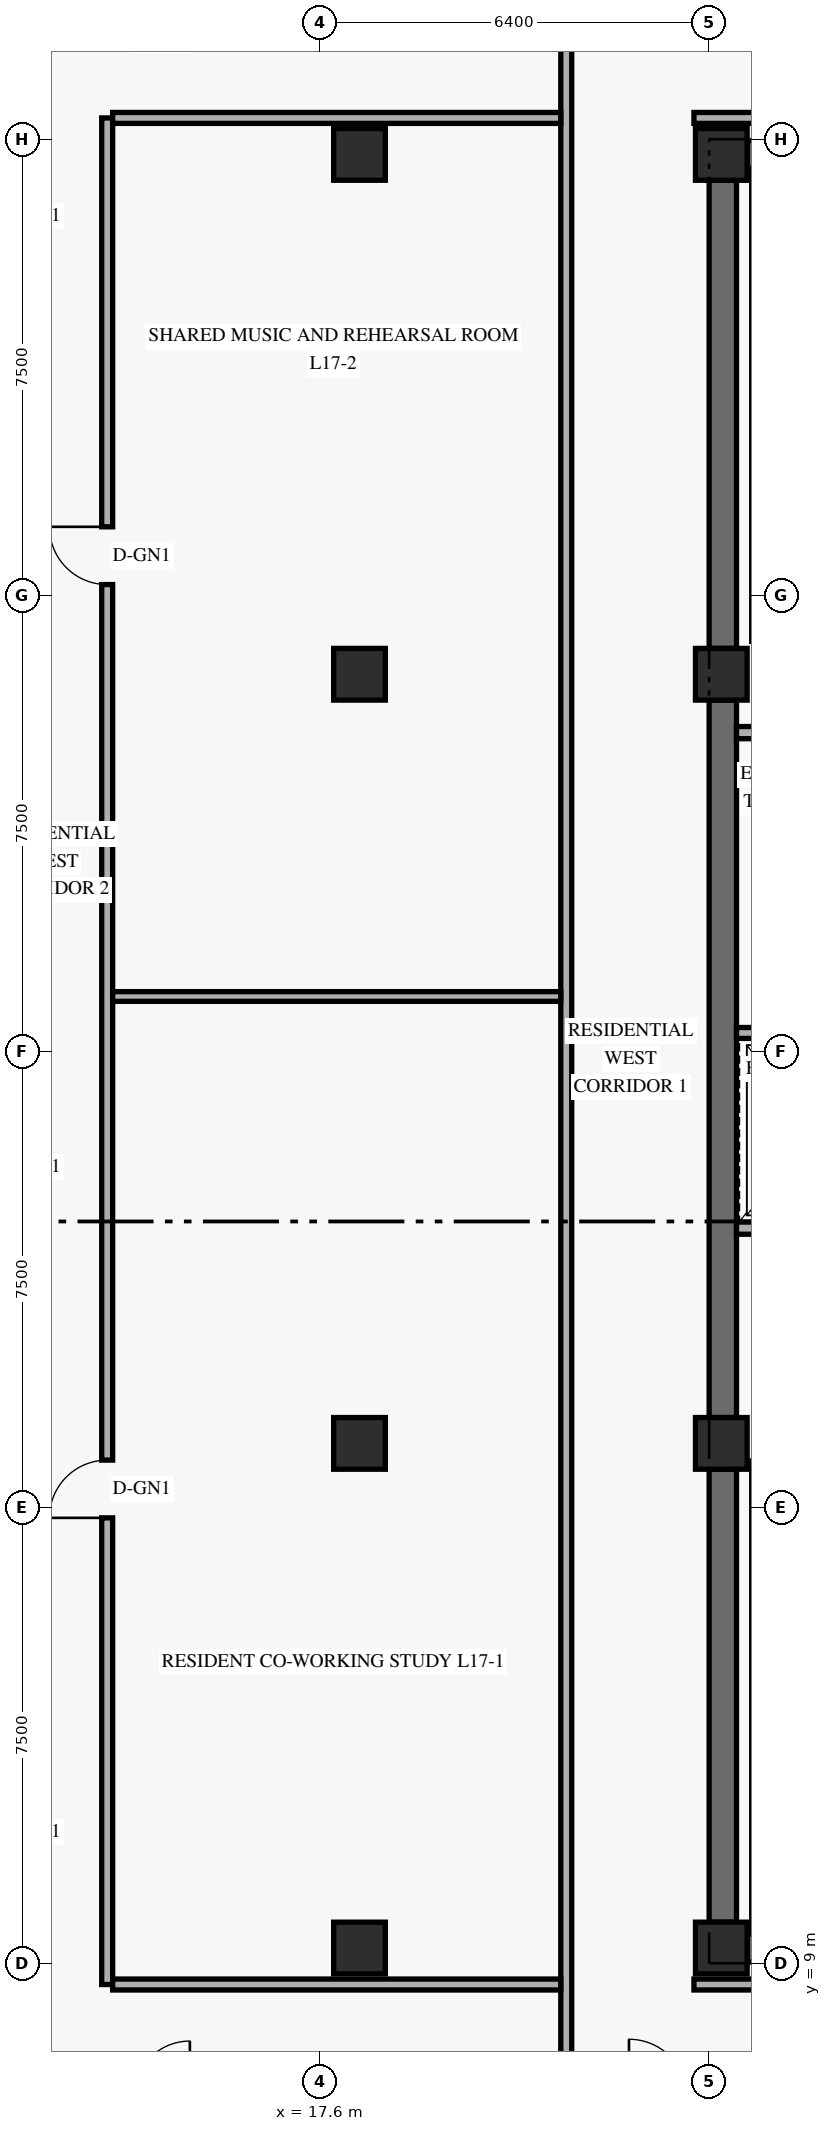
"""IFC4 building model, lengths in metres.
Left out: names, types, materials, properties, quantities, classifications, styles, units other than length and angle.
Written with IfcOpenShell. Run it as: python <this file> out.ifc"""

import sys

from ifc_helpers import new_model, si_unit, direction, frame, frame_2d, origin, origin_2d, place, context, subcontext, project, spatial, rectangle, extrude, element, fill, save


model = new_model("IFC4")
c1 = context("Model", 3, precision=1e-05, world=origin(), true_north=direction((0.0, 1.0)))
c2 = subcontext(c1, "Body", "Model", "MODEL_VIEW")
j1 = project(units=[si_unit("LENGTHUNIT", "METRE"), si_unit("PLANEANGLEUNIT", "RADIAN")], contexts=[c1])
p1 = place(None, origin())
s1 = spatial("IfcSite", under=j1, at=p1, CompositionType="ELEMENT")
p2 = place(p1, origin())
s2 = spatial("IfcBuilding", under=s1, at=p2, CompositionType="ELEMENT")
p3 = place(p2, frame((0.0, 0.0, 67.8)))
s3 = spatial("IfcBuildingStorey", under=s2, at=p3, CompositionType="ELEMENT", Elevation=67.8)
p4 = place(p3, frame((24.225, 9.675, 0.0), z_axis=(0.0, 0.0, 1.0), x_axis=(0.0, 1.0, 0.0)))
e1 = element("IfcWall", 1, at=p4, inside=s3, PredefinedType="SHEAR", context=c2, shape_type="SweptSolid", body=[
    extrude(rectangle(XDim=7.45, YDim=0.45, at=frame_2d((3.725, 0.0))), origin(), (0.0, 0.0, 1.0), 2.607),
])
p5 = place(p3, frame((24.225, 17.975, 0.0), z_axis=(0.0, 0.0, 1.0), x_axis=(0.0, 1.0, 0.0)))
e2 = element("IfcWall", 2, at=p5, inside=s3, PredefinedType="SHEAR", context=c2, shape_type="SweptSolid", body=[
    extrude(rectangle(XDim=11.8, YDim=0.45, at=frame_2d((5.9, 0.0))), origin(), (0.0, 0.0, 1.0), 2.607),
])
p6 = place(p3, frame((24.225, 30.625, 0.0), z_axis=(0.0, 0.0, 1.0), x_axis=(0.0, 1.0, 0.0)))
e3 = element("IfcWall", 3, at=p6, inside=s3, PredefinedType="SHEAR", context=c2, shape_type="SweptSolid", body=[
    extrude(rectangle(XDim=7.7, YDim=0.45, at=frame_2d((3.85, 0.0))), origin(), (0.0, 0.0, 1.0), 2.607),
])
for number, where, z_axis, x_axis in (
    (4, (24.625, 9.25, 0.0), (0.0, 0.0, 1.0), (1.0, 0.0, 0.0)),
    (5, (24.625, 38.75, 0.0), (0.0, 0.0, 1.0), (1.0, 0.0, 0.0)),
):
    element("IfcWall", number, at=place(p3, frame(where, z_axis=z_axis, x_axis=x_axis)), inside=s3, PredefinedType="SHEAR", context=c2, shape_type="SweptSolid", body=[
        extrude(rectangle(XDim=10.15, YDim=0.45, at=frame_2d((5.075, 0.0))), origin(), (0.0, 0.0, 1.0), 3.3),
    ])
for number, where, z_axis, x_axis in (
    (6, (18.25, 9.25, 0.0), (0.0, 0.0, 1.0), (1.0, 0.0, 0.0)),
    (7, (18.25, 17.55, 0.0), (0.0, 0.0, 1.0), (1.0, 0.0, 0.0)),
    (8, (18.25, 30.2, 0.0), (0.0, 0.0, 1.0), (1.0, 0.0, 0.0)),
    (9, (18.25, 38.75, 0.0), (0.0, 0.0, 1.0), (1.0, 0.0, 0.0)),
    (10, (24.2, 9.25, 0.0), (0.0, 0.0, 1.0), (1.0, 0.0, 0.0)),
    (11, (24.2, 17.55, 0.0), (0.0, 0.0, 1.0), (1.0, 0.0, 0.0)),
    (12, (24.2, 30.2, 0.0), (0.0, 0.0, 1.0), (1.0, 0.0, 0.0)),
    (13, (24.2, 38.75, 0.0), (0.0, 0.0, 1.0), (1.0, 0.0, 0.0)),
):
    element("IfcColumn", number, at=place(p3, frame(where, z_axis=z_axis, x_axis=x_axis)), inside=s3, PredefinedType="COLUMN", context=c2, shape_type="SweptSolid", body=[
        extrude(rectangle(XDim=0.85, YDim=0.85, at=origin_2d()), origin(), (0.0, 0.0, 1.0), 3.6),
    ])
p7 = place(p3, frame((24.45, 21.09, 0.0), z_axis=(0.0, 0.0, 1.0), x_axis=(1.0, 0.0, 0.0)))
e14 = element("IfcWall", 14, at=p7, inside=s3, PredefinedType="STANDARD", context=c2, shape_type="SweptSolid", body=[
    extrude(rectangle(XDim=6.83, YDim=0.2, at=frame_2d((3.415, 0.0))), origin(), (0.0, 0.0, 1.0), 3.3),
])
p8 = place(p7, frame((0.72, 0.0, 0.0)))
e15 = element("IfcOpeningElement", 15, at=p8, cuts=e14, PredefinedType="OPENING", context=c2, shape_type="SweptSolid", body=[
    extrude(rectangle(XDim=1.1, YDim=2.2, at=frame_2d((0.55, 1.1))), frame((0.0, 0.11, 0.0), z_axis=(0.0, -1.0, 0.0), x_axis=(1.0, 0.0, 0.0)), (0.0, 0.0, 1.0), 0.22),
])
p9 = place(p7, frame((3.32, 0.0, 0.0)))
e16 = element("IfcOpeningElement", 16, at=p9, cuts=e14, PredefinedType="OPENING", context=c2, shape_type="SweptSolid", body=[
    extrude(rectangle(XDim=1.1, YDim=2.2, at=frame_2d((0.55, 1.1))), frame((0.0, 0.11, 0.0), z_axis=(0.0, -1.0, 0.0), x_axis=(1.0, 0.0, 0.0)), (0.0, 0.0, 1.0), 0.22),
])
p10 = place(p3, frame((24.45, 24.3, 0.0), z_axis=(0.0, 0.0, 1.0), x_axis=(1.0, 0.0, 0.0)))
e17 = element("IfcWall", 17, at=p10, inside=s3, PredefinedType="STANDARD", context=c2, shape_type="SweptSolid", body=[
    extrude(rectangle(XDim=6.83, YDim=0.18, at=frame_2d((3.415, 0.0))), origin(), (0.0, 0.0, 1.0), 3.3),
])
p11 = place(p3, frame((24.45, 29.24, 0.0), z_axis=(0.0, 0.0, 1.0), x_axis=(1.0, 0.0, 0.0)))
e18 = element("IfcWall", 18, at=p11, inside=s3, PredefinedType="STANDARD", context=c2, shape_type="SweptSolid", body=[
    extrude(rectangle(XDim=3.65, YDim=0.2, at=frame_2d((1.825, 0.0))), origin(), (0.0, 0.0, 1.0), 3.3),
])
p12 = place(p3, frame((21.65, 6.8, 0.0), z_axis=(0.0, 0.0, 1.0), x_axis=(0.0, 1.0, 0.0)))
e19 = element("IfcWall", 19, at=p12, inside=s3, PredefinedType="STANDARD", context=c2, shape_type="SweptSolid", body=[
    extrude(rectangle(XDim=34.4, YDim=0.18, at=frame_2d((17.2, 0.0))), origin(), (0.0, 0.0, 1.0), 2.589),
])
for number, where, z_axis, x_axis in (
    (20, (23.75, 8.65, 0.0), (0.0, 0.0, 1.0), (1.0, 0.0, 0.0)),
    (21, (23.75, 39.35, 0.0), (0.0, 0.0, 1.0), (1.0, 0.0, 0.0)),
):
    element("IfcWall", number, at=place(p3, frame(where, z_axis=z_axis, x_axis=x_axis)), inside=s3, PredefinedType="STANDARD", context=c2, shape_type="SweptSolid", body=[
        extrude(rectangle(XDim=11.67, YDim=0.18, at=frame_2d((5.835, 0.0))), origin(), (0.0, 0.0, 1.0), 2.589),
    ])
p13 = place(p3, frame((14.1, 8.65, 0.0), z_axis=(0.0, 0.0, 1.0), x_axis=(0.0, 1.0, 0.0)))
e22 = element("IfcWall", 22, at=p13, inside=s3, PredefinedType="STANDARD", context=c2, shape_type="SweptSolid", body=[
    extrude(rectangle(XDim=30.7, YDim=0.18, at=frame_2d((15.35, 0.0))), origin(), (0.0, 0.0, 1.0), 2.589),
])
p14 = place(p13, frame((7.675, 0.0, 0.0)))
e23 = element("IfcOpeningElement", 23, at=p14, cuts=e22, PredefinedType="OPENING", context=c2, shape_type="SweptSolid", body=[
    extrude(rectangle(XDim=0.95, YDim=2.15, at=frame_2d((0.475, 1.075))), frame((0.0, 0.1, 0.0), z_axis=(0.0, -1.0, 0.0), x_axis=(1.0, 0.0, 0.0)), (0.0, 0.0, 1.0), 0.2),
])
p15 = place(p13, frame((23.025, 0.0, 0.0)))
e24 = element("IfcOpeningElement", 24, at=p15, cuts=e22, PredefinedType="OPENING", context=c2, shape_type="SweptSolid", body=[
    extrude(rectangle(XDim=0.95, YDim=2.15, at=frame_2d((0.475, 1.075))), frame((0.0, 0.1, 0.0), z_axis=(0.0, -1.0, 0.0), x_axis=(1.0, 0.0, 0.0)), (0.0, 0.0, 1.0), 0.2),
])
for number, where, z_axis, x_axis in (
    (25, (14.19, 8.65, 0.0), (0.0, 0.0, 1.0), (1.0, 0.0, 0.0)),
    (26, (14.19, 39.35, 0.0), (0.0, 0.0, 1.0), (1.0, 0.0, 0.0)),
):
    element("IfcWall", number, at=place(p3, frame(where, z_axis=z_axis, x_axis=x_axis)), inside=s3, PredefinedType="STANDARD", context=c2, shape_type="SweptSolid", body=[
        extrude(rectangle(XDim=7.37, YDim=0.18, at=frame_2d((3.685, 0.0))), origin(), (0.0, 0.0, 1.0), 2.589),
    ])
p16 = place(p3, frame((14.19, 24.9, 0.0), z_axis=(0.0, 0.0, 1.0), x_axis=(1.0, 0.0, 0.0)))
e27 = element("IfcWall", 27, at=p16, inside=s3, PredefinedType="PARTITIONING", context=c2, shape_type="SweptSolid", body=[
    extrude(rectangle(XDim=7.37, YDim=0.16, at=frame_2d((3.685, 0.0))), origin(), (0.0, 0.0, 1.0), 2.589),
])
p17 = place(p14, origin())
e28 = element("IfcDoor", 28, at=p17, inside=s3, OperationType="SINGLE_SWING_LEFT", PredefinedType="DOOR", context=c2, shape_type="SweptSolid", body=[
    extrude(rectangle(XDim=0.95, YDim=2.15, at=frame_2d((0.475, 1.075))), frame((0.0, 0.025, 0.0), z_axis=(0.0, -1.0, 0.0), x_axis=(1.0, 0.0, 0.0)), (0.0, 0.0, 1.0), 0.05),
])
fill(e23, e28)
p18 = place(p15, origin())
e29 = element("IfcDoor", 29, at=p18, inside=s3, OperationType="SINGLE_SWING_RIGHT", PredefinedType="DOOR", context=c2, shape_type="SweptSolid", body=[
    extrude(rectangle(XDim=0.95, YDim=2.15, at=frame_2d((0.475, 1.075))), frame((0.0, 0.025, 0.0), z_axis=(0.0, -1.0, 0.0), x_axis=(1.0, 0.0, 0.0)), (0.0, 0.0, 1.0), 0.05),
])
fill(e24, e29)
save(model, sys.argv[1])
